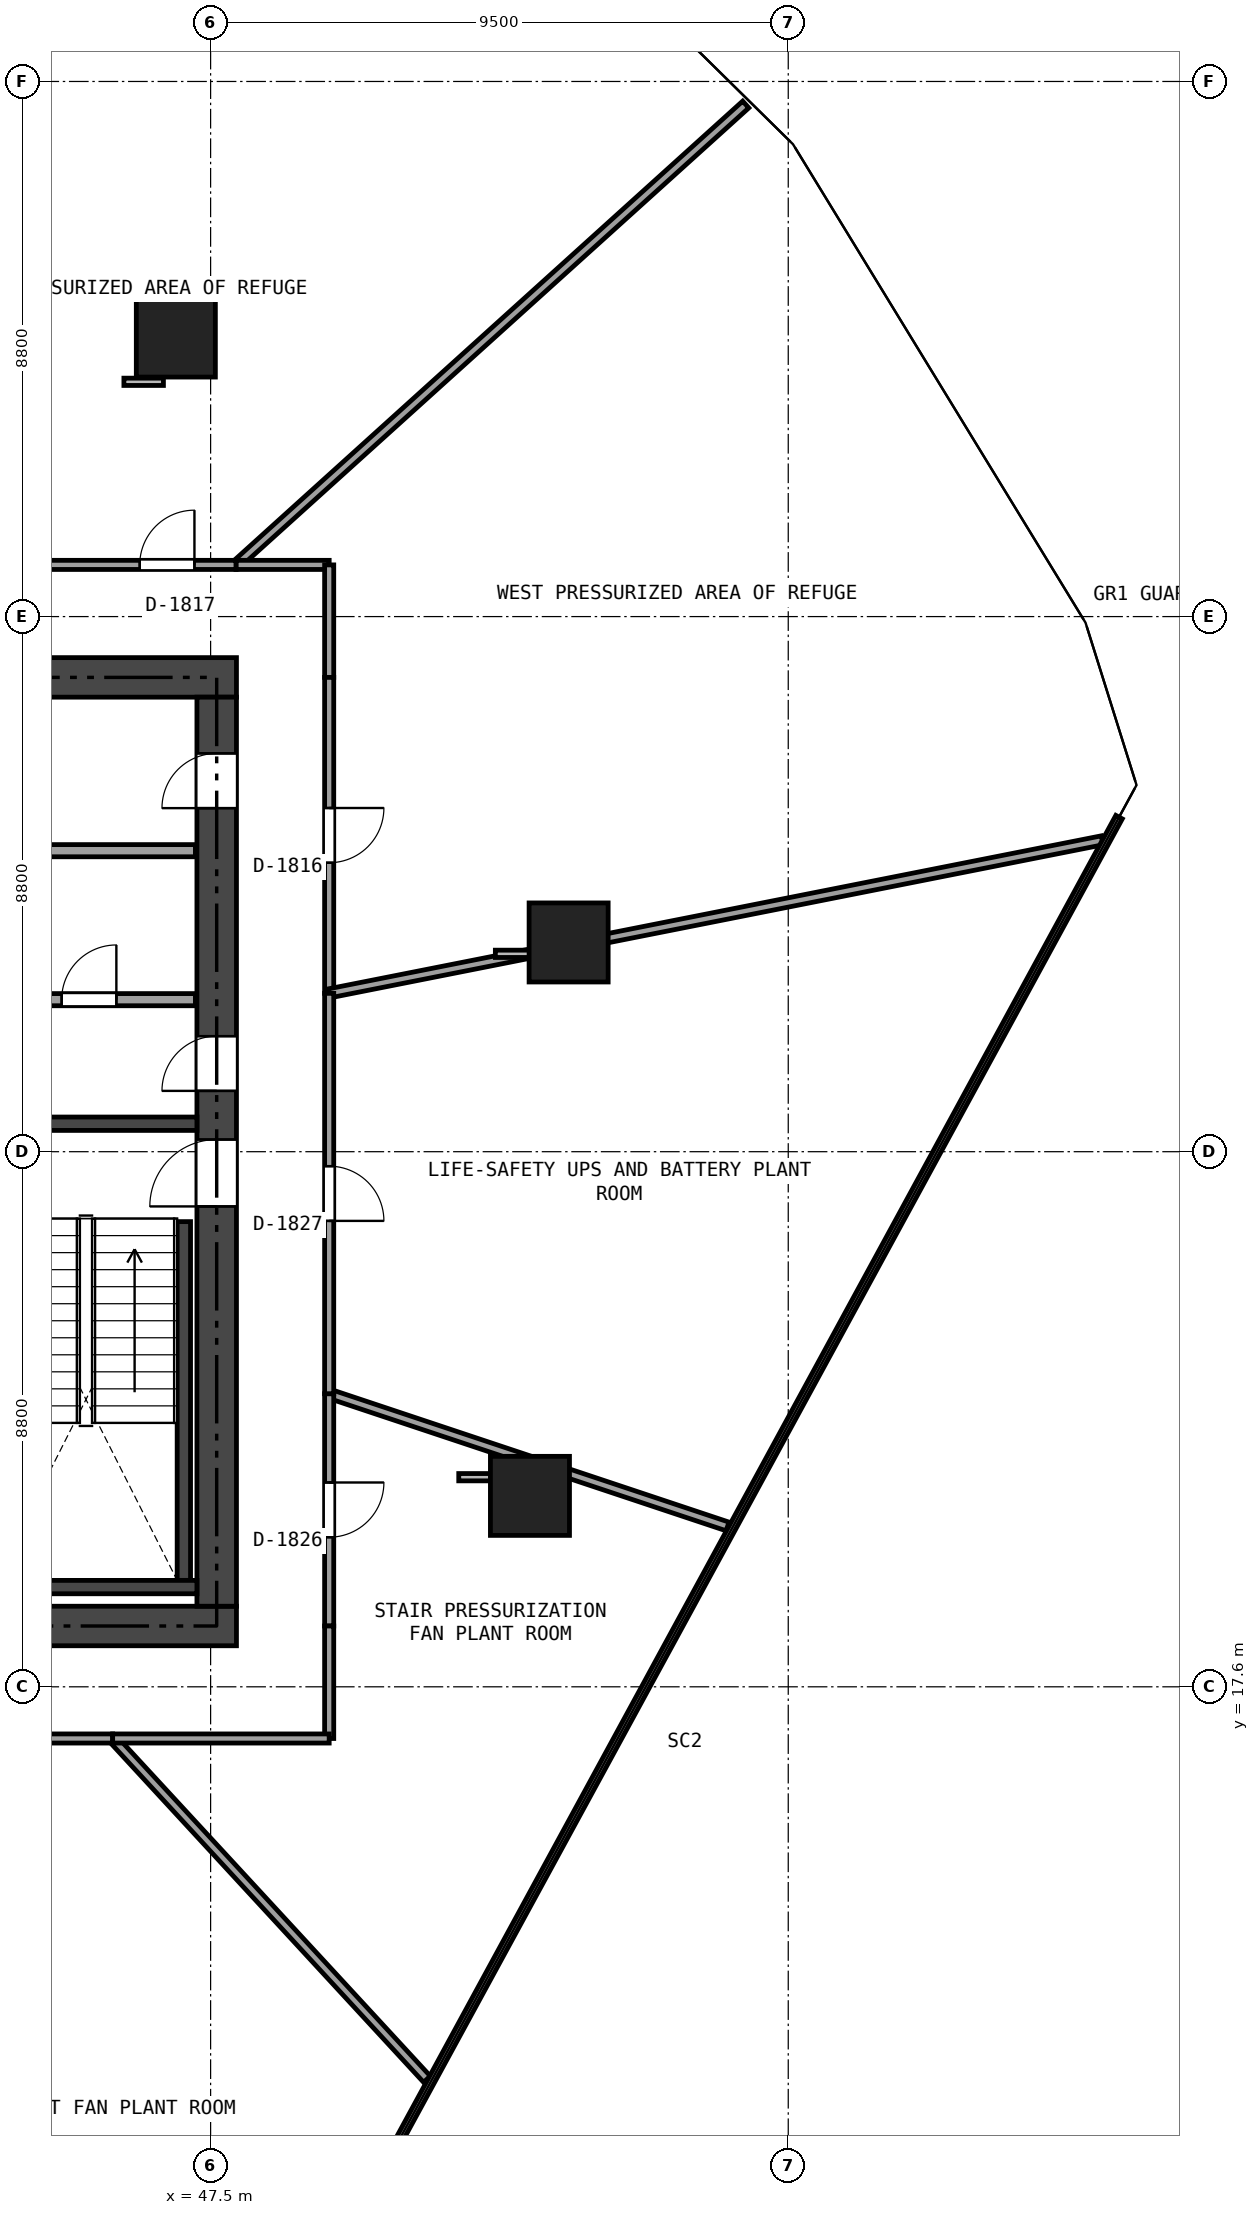
"""IFC4 building model, lengths in metres.
Left out: names, types, materials, properties, quantities, classifications, styles, units other than length and angle.
Written with IfcOpenShell. Run it as: python <this file> out.ifc"""

import sys

from ifc_helpers import new_model, si_unit, direction, frame, frame_2d, origin, origin_2d, place, context, subcontext, project, spatial, rectangle, extrude, element, fill, save


model = new_model("IFC4")
c1 = context("Model", 3, precision=1e-05, world=origin(), true_north=direction((0.0, 1.0)))
c2 = subcontext(c1, "Body", "Model", "MODEL_VIEW")
j1 = project(units=[si_unit("LENGTHUNIT", "METRE"), si_unit("PLANEANGLEUNIT", "RADIAN")], contexts=[c1])
p1 = place(None, origin())
s1 = spatial("IfcSite", under=j1, at=p1, CompositionType="ELEMENT")
p2 = place(p1, origin())
s2 = spatial("IfcBuilding", under=s1, at=p2, CompositionType="ELEMENT")
p3 = place(p2, frame((0.0, 0.0, 71.85)))
s3 = spatial("IfcBuildingStorey", under=s2, at=p3, CompositionType="ELEMENT", Elevation=71.85)
p4 = place(p3, frame((26.475, 18.6, 0.0), z_axis=(0.0, 0.0, 1.0), x_axis=(1.0, 0.0, 0.0)))
e1 = element("IfcWall", 1, at=p4, inside=s3, PredefinedType="SHEAR", context=c2, shape_type="SweptSolid", body=[
    extrude(rectangle(XDim=21.45, YDim=0.65, at=frame_2d((10.725, 0.0))), origin(), (0.0, 0.0, 1.0), 4.08),
])
p5 = place(p4, frame((12.45, 0.0, 0.0)))
e2 = element("IfcOpeningElement", 2, at=p5, cuts=e1, PredefinedType="OPENING", context=c2, shape_type="SweptSolid", body=[
    extrude(rectangle(XDim=1.15, YDim=2.15, at=frame_2d((0.575, 1.075))), frame((0.0, 0.335, 0.0), z_axis=(0.0, -1.0, 0.0), x_axis=(1.0, 0.0, 0.0)), (0.0, 0.0, 1.0), 0.67),
])
p6 = place(p4, frame((5.275, 0.0, 0.0)))
e3 = element("IfcOpeningElement", 3, at=p6, cuts=e1, PredefinedType="OPENING", context=c2, shape_type="SweptSolid", body=[
    extrude(rectangle(XDim=0.9, YDim=2.1, at=frame_2d((0.45, 1.05))), frame((0.0, 0.335, 0.0), z_axis=(0.0, -1.0, 0.0), x_axis=(1.0, 0.0, 0.0)), (0.0, 0.0, 1.0), 0.67),
])
p7 = place(p3, frame((26.475, 34.2, 0.0), z_axis=(0.0, 0.0, 1.0), x_axis=(1.0, 0.0, 0.0)))
e4 = element("IfcWall", 4, at=p7, inside=s3, PredefinedType="SHEAR", context=c2, shape_type="SweptSolid", body=[
    extrude(rectangle(XDim=21.45, YDim=0.65, at=frame_2d((10.725, 0.0))), origin(), (0.0, 0.0, 1.0), 4.08),
])
p8 = place(p7, frame((9.725, 0.0, 0.0)))
e5 = element("IfcOpeningElement", 5, at=p8, cuts=e4, PredefinedType="OPENING", context=c2, shape_type="SweptSolid", body=[
    extrude(rectangle(XDim=1.1, YDim=2.15, at=frame_2d((0.55, 1.075))), frame((0.0, 0.335, 0.0), z_axis=(0.0, -1.0, 0.0), x_axis=(1.0, 0.0, 0.0)), (0.0, 0.0, 1.0), 0.67),
])
p9 = place(p7, frame((1.975, 0.0, 0.0)))
e6 = element("IfcOpeningElement", 6, at=p9, cuts=e4, PredefinedType="OPENING", context=c2, shape_type="SweptSolid", body=[
    extrude(rectangle(XDim=0.9, YDim=2.1, at=frame_2d((0.45, 1.05))), frame((0.0, 0.335, 0.0), z_axis=(0.0, -1.0, 0.0), x_axis=(1.0, 0.0, 0.0)), (0.0, 0.0, 1.0), 0.67),
])
p10 = place(p7, frame((6.275, 0.0, 0.0)))
e7 = element("IfcOpeningElement", 7, at=p10, cuts=e4, PredefinedType="OPENING", context=c2, shape_type="SweptSolid", body=[
    extrude(rectangle(XDim=0.9, YDim=2.1, at=frame_2d((0.45, 1.05))), frame((0.0, 0.335, 0.0), z_axis=(0.0, -1.0, 0.0), x_axis=(1.0, 0.0, 0.0)), (0.0, 0.0, 1.0), 0.67),
])
p11 = place(p3, frame((47.6, 18.925, 0.0), z_axis=(0.0, 0.0, 1.0), x_axis=(0.0, 1.0, 0.0)))
e8 = element("IfcWall", 8, at=p11, inside=s3, PredefinedType="SHEAR", context=c2, shape_type="SweptSolid", body=[
    extrude(rectangle(XDim=14.95, YDim=0.65, at=frame_2d((7.475, 0.0))), origin(), (0.0, 0.0, 1.0), 4.08),
])
p12 = place(p11, frame((6.575, 0.0, 0.0)))
e9 = element("IfcOpeningElement", 9, at=p12, cuts=e8, PredefinedType="OPENING", context=c2, shape_type="SweptSolid", body=[
    extrude(rectangle(XDim=1.1, YDim=2.15, at=frame_2d((0.55, 1.075))), frame((0.0, 0.335, 0.0), z_axis=(0.0, -1.0, 0.0), x_axis=(1.0, 0.0, 0.0)), (0.0, 0.0, 1.0), 0.67),
])
p13 = place(p11, frame((8.475, 0.0, 0.0)))
e10 = element("IfcOpeningElement", 10, at=p13, cuts=e8, PredefinedType="OPENING", context=c2, shape_type="SweptSolid", body=[
    extrude(rectangle(XDim=0.9, YDim=2.1, at=frame_2d((0.45, 1.05))), frame((0.0, 0.335, 0.0), z_axis=(0.0, -1.0, 0.0), x_axis=(1.0, 0.0, 0.0)), (0.0, 0.0, 1.0), 0.67),
])
p14 = place(p11, frame((13.125, 0.0, 0.0)))
e11 = element("IfcOpeningElement", 11, at=p14, cuts=e8, PredefinedType="OPENING", context=c2, shape_type="SweptSolid", body=[
    extrude(rectangle(XDim=0.9, YDim=2.1, at=frame_2d((0.45, 1.05))), frame((0.0, 0.335, 0.0), z_axis=(0.0, -1.0, 0.0), x_axis=(1.0, 0.0, 0.0)), (0.0, 0.0, 1.0), 0.67),
])
p15 = place(p3, frame((43.95, 26.86, 0.0), z_axis=(0.0, 0.0, 1.0), x_axis=(1.0, 0.0, 0.0)))
e12 = element("IfcWall", 12, at=p15, inside=s3, PredefinedType="SHEAR", context=c2, shape_type="SweptSolid", body=[
    extrude(rectangle(XDim=3.325, YDim=0.22, at=frame_2d((1.663, 0.0))), origin(), (0.0, 0.0, 1.0), 4.08),
])
p16 = place(p3, frame((47.06, 19.35, 0.0), z_axis=(0.0, 0.0, 1.0), x_axis=(0.0, 1.0, 0.0)))
e13 = element("IfcWall", 13, at=p16, inside=s3, PredefinedType="SHEAR", context=c2, shape_type="SweptSolid", body=[
    extrude(rectangle(XDim=5.9, YDim=0.22, at=frame_2d((2.95, 0.0))), origin(), (0.0, 0.0, 1.0), 4.08),
])
p17 = place(p3, frame((43.95, 19.24, 0.0), z_axis=(0.0, 0.0, 1.0), x_axis=(1.0, 0.0, 0.0)))
e14 = element("IfcWall", 14, at=p17, inside=s3, PredefinedType="SHEAR", context=c2, shape_type="SweptSolid", body=[
    extrude(rectangle(XDim=3.325, YDim=0.22, at=frame_2d((1.663, 0.0))), origin(), (0.0, 0.0, 1.0), 4.08),
])
for number, where, z_axis, x_axis in (
    (15, (53.388, 29.841, 0.0), (0.0, 0.0, 1.0), (1.0, 0.0, 0.0)),
    (16, (46.928, 39.789, 0.0), (0.0, 0.0, 1.0), (1.0, 0.0, 0.0)),
    (17, (52.752, 20.74, 0.0), (0.0, 0.0, 1.0), (1.0, 0.0, 0.0)),
):
    element("IfcColumn", number, at=place(p3, frame(where, z_axis=z_axis, x_axis=x_axis)), inside=s3, PredefinedType="COLUMN", context=c2, shape_type="SweptSolid", body=[
        extrude(rectangle(XDim=1.3, YDim=1.3, at=origin_2d()), origin(), (0.0, 0.0, 1.0), 4.08),
    ])
p18 = place(p3, frame((43.9, 28.9, 0.0), z_axis=(0.0, 0.0, 1.0), x_axis=(1.0, 0.0, 0.0)))
e18 = element("IfcWall", 18, at=p18, inside=s3, PredefinedType="SOLIDWALL", context=c2, shape_type="SweptSolid", body=[
    extrude(rectangle(XDim=3.35, YDim=0.2, at=frame_2d((1.675, 0.0))), origin(), (0.0, 0.0, 1.0), 4.08),
])
p19 = place(p18, frame((1.15, 0.0, 0.0)))
e19 = element("IfcOpeningElement", 19, at=p19, cuts=e18, PredefinedType="OPENING", context=c2, shape_type="SweptSolid", body=[
    extrude(rectangle(XDim=0.9, YDim=2.1, at=frame_2d((0.45, 1.05))), frame((0.0, 0.11, 0.0), z_axis=(0.0, -1.0, 0.0), x_axis=(1.0, 0.0, 0.0)), (0.0, 0.0, 1.0), 0.22),
])
p20 = place(p3, frame((43.9, 31.35, 0.0), z_axis=(0.0, 0.0, 1.0), x_axis=(1.0, 0.0, 0.0)))
e20 = element("IfcWall", 20, at=p20, inside=s3, PredefinedType="SOLIDWALL", context=c2, shape_type="SweptSolid", body=[
    extrude(rectangle(XDim=3.35, YDim=0.2, at=frame_2d((1.675, 0.0))), origin(), (0.0, 0.0, 1.0), 4.08),
])
p21 = place(p3, frame((56.301, 43.621, 0.0), z_axis=(0.0, 0.0, 1.0), x_axis=(-0.74217442222, -0.670206779287, 0.0)))
e21 = element("IfcWall", 21, at=p21, inside=s3, PredefinedType="PARTITIONING", context=c2, shape_type="SweptSolid", body=[
    extrude(rectangle(XDim=11.297, YDim=0.15, at=frame_2d((5.648, 0.0))), origin(), (0.0, 0.0, 1.0), 3.265),
])
p22 = place(p3, frame((47.917, 36.05, 0.0), z_axis=(0.0, 0.0, 1.0), x_axis=(1.0, 0.0, 0.0)))
e22 = element("IfcWall", 22, at=p22, inside=s3, PredefinedType="PARTITIONING", context=c2, shape_type="SweptSolid", body=[
    extrude(rectangle(XDim=1.533, YDim=0.15, at=frame_2d((0.767, 0.0))), origin(), (0.0, 0.0, 1.0), 3.265),
])
p23 = place(p3, frame((49.45, 36.05, 0.0), z_axis=(0.0, 0.0, 1.0), x_axis=(0.0, -1.0, 0.0)))
e23 = element("IfcWall", 23, at=p23, inside=s3, PredefinedType="PARTITIONING", context=c2, shape_type="SweptSolid", body=[
    extrude(rectangle(XDim=1.85, YDim=0.15, at=frame_2d((0.925, 0.0))), origin(), (0.0, 0.0, 1.0), 3.265),
])
p24 = place(p3, frame((49.45, 34.2, 0.0), z_axis=(0.0, 0.0, 1.0), x_axis=(0.0, -1.0, 0.0)))
e24 = element("IfcWall", 24, at=p24, inside=s3, PredefinedType="PARTITIONING", context=c2, shape_type="SweptSolid", body=[
    extrude(rectangle(XDim=5.196, YDim=0.15, at=frame_2d((2.598, 0.0))), origin(), (0.0, 0.0, 1.0), 3.065),
])
p25 = place(p24, frame((2.148, 0.0, 0.0)))
e25 = element("IfcOpeningElement", 25, at=p25, cuts=e24, PredefinedType="OPENING", context=c2, shape_type="SweptSolid", body=[
    extrude(rectangle(XDim=0.9, YDim=2.0, at=frame_2d((0.45, 1.0))), frame((0.0, 0.085, 0.0), z_axis=(0.0, -1.0, 0.0), x_axis=(1.0, 0.0, 0.0)), (0.0, 0.0, 1.0), 0.17),
])
p26 = place(p3, frame((49.45, 29.004, 0.0), z_axis=(0.0, 0.0, 1.0), x_axis=(0.980960623522, 0.194206732886, 0.0)))
e26 = element("IfcWall", 26, at=p26, inside=s3, PredefinedType="PARTITIONING", context=c2, shape_type="SweptSolid", body=[
    extrude(rectangle(XDim=12.961, YDim=0.15, at=frame_2d((6.48, 0.0))), origin(), (0.0, 0.0, 1.0), 3.065),
])
p27 = place(p3, frame((40.335, 36.05, 0.0), z_axis=(0.0, 0.0, 1.0), x_axis=(1.0, 0.0, 0.0)))
e27 = element("IfcWall", 27, at=p27, inside=s3, PredefinedType="PARTITIONING", context=c2, shape_type="SweptSolid", body=[
    extrude(rectangle(XDim=7.582, YDim=0.15, at=frame_2d((3.791, 0.0))), origin(), (0.0, 0.0, 1.0), 3.065),
])
p28 = place(p27, frame((5.999, 0.0, 0.0)))
e28 = element("IfcOpeningElement", 28, at=p28, cuts=e27, PredefinedType="OPENING", context=c2, shape_type="SweptSolid", body=[
    extrude(rectangle(XDim=0.9, YDim=2.0, at=frame_2d((0.45, 1.0))), frame((0.0, 0.085, 0.0), z_axis=(0.0, -1.0, 0.0), x_axis=(1.0, 0.0, 0.0)), (0.0, 0.0, 1.0), 0.17),
])
p29 = place(p3, frame((51.058, 11.147, 0.0), z_axis=(0.0, 0.0, 1.0), x_axis=(-0.678079226392, 0.734988818103, 0.0)))
e29 = element("IfcWall", 29, at=p29, inside=s3, PredefinedType="PARTITIONING", context=c2, shape_type="SweptSolid", body=[
    extrude(rectangle(XDim=7.623, YDim=0.15, at=frame_2d((3.812, 0.0))), origin(), (0.0, 0.0, 1.0), 3.265),
])
p30 = place(p3, frame((45.889, 16.75, 0.0), z_axis=(0.0, 0.0, 1.0), x_axis=(-1.0, 0.0, 0.0)))
e30 = element("IfcWall", 30, at=p30, inside=s3, PredefinedType="PARTITIONING", context=c2, shape_type="SweptSolid", body=[
    extrude(rectangle(XDim=6.638, YDim=0.15, at=frame_2d((3.319, 0.0))), origin(), (0.0, 0.0, 1.0), 3.065),
])
p31 = place(p30, frame((2.869, 0.0, 0.0)))
e31 = element("IfcOpeningElement", 31, at=p31, cuts=e30, PredefinedType="OPENING", context=c2, shape_type="SweptSolid", body=[
    extrude(rectangle(XDim=0.9, YDim=2.0, at=frame_2d((0.45, 1.0))), frame((0.0, 0.085, 0.0), z_axis=(0.0, -1.0, 0.0), x_axis=(1.0, 0.0, 0.0)), (0.0, 0.0, 1.0), 0.17),
])
p32 = place(p3, frame((56.002, 20.237, 0.0), z_axis=(0.0, 0.0, 1.0), x_axis=(-0.94873277877, 0.316079285128, 0.0)))
e32 = element("IfcWall", 32, at=p32, inside=s3, PredefinedType="PARTITIONING", context=c2, shape_type="SweptSolid", body=[
    extrude(rectangle(XDim=6.906, YDim=0.15, at=frame_2d((3.453, 0.0))), origin(), (0.0, 0.0, 1.0), 4.08),
])
p33 = place(p3, frame((49.45, 22.42, 0.0), z_axis=(0.0, 0.0, 1.0), x_axis=(0.0, -1.0, 0.0)))
e33 = element("IfcWall", 33, at=p33, inside=s3, PredefinedType="PARTITIONING", context=c2, shape_type="SweptSolid", body=[
    extrude(rectangle(XDim=3.82, YDim=0.15, at=frame_2d((1.91, 0.0))), origin(), (0.0, 0.0, 1.0), 3.065),
])
p34 = place(p33, frame((1.46, 0.0, 0.0)))
e34 = element("IfcOpeningElement", 34, at=p34, cuts=e33, PredefinedType="OPENING", context=c2, shape_type="SweptSolid", body=[
    extrude(rectangle(XDim=0.9, YDim=2.0, at=frame_2d((0.45, 1.0))), frame((0.0, 0.085, 0.0), z_axis=(0.0, -1.0, 0.0), x_axis=(1.0, 0.0, 0.0)), (0.0, 0.0, 1.0), 0.17),
])
p35 = place(p3, frame((49.45, 18.6, 0.0), z_axis=(0.0, 0.0, 1.0), x_axis=(0.0, -1.0, 0.0)))
e35 = element("IfcWall", 35, at=p35, inside=s3, PredefinedType="PARTITIONING", context=c2, shape_type="SweptSolid", body=[
    extrude(rectangle(XDim=1.85, YDim=0.15, at=frame_2d((0.925, 0.0))), origin(), (0.0, 0.0, 1.0), 3.265),
])
p36 = place(p3, frame((49.45, 16.75, 0.0), z_axis=(0.0, 0.0, 1.0), x_axis=(-1.0, 0.0, 0.0)))
e36 = element("IfcWall", 36, at=p36, inside=s3, PredefinedType="PARTITIONING", context=c2, shape_type="SweptSolid", body=[
    extrude(rectangle(XDim=3.561, YDim=0.15, at=frame_2d((1.781, 0.0))), origin(), (0.0, 0.0, 1.0), 3.265),
])
p37 = place(p3, frame((49.45, 29.004, 0.0), z_axis=(0.0, 0.0, 1.0), x_axis=(0.0, -1.0, 0.0)))
e37 = element("IfcWall", 37, at=p37, inside=s3, PredefinedType="PARTITIONING", context=c2, shape_type="SweptSolid", body=[
    extrude(rectangle(XDim=6.584, YDim=0.15, at=frame_2d((3.292, 0.0))), origin(), (0.0, 0.0, 1.0), 3.065),
])
p38 = place(p37, frame((2.842, 0.0, 0.0)))
e38 = element("IfcOpeningElement", 38, at=p38, cuts=e37, PredefinedType="OPENING", context=c2, shape_type="SweptSolid", body=[
    extrude(rectangle(XDim=0.9, YDim=2.0, at=frame_2d((0.45, 1.0))), frame((0.0, 0.085, 0.0), z_axis=(0.0, -1.0, 0.0), x_axis=(1.0, 0.0, 0.0)), (0.0, 0.0, 1.0), 0.17),
])
p39 = place(p12, origin())
e39 = element("IfcDoor", 39, at=p39, inside=s3, OperationType="SINGLE_SWING_LEFT", PredefinedType="DOOR", context=c2, shape_type="SweptSolid", body=[
    extrude(rectangle(XDim=1.1, YDim=2.15, at=frame_2d((0.55, 1.075))), frame((0.0, 0.025, 0.0), z_axis=(0.0, -1.0, 0.0), x_axis=(1.0, 0.0, 0.0)), (0.0, 0.0, 1.0), 0.05),
])
fill(e9, e39)
p40 = place(p13, origin())
e40 = element("IfcDoor", 40, at=p40, inside=s3, OperationType="SINGLE_SWING_LEFT", PredefinedType="DOOR", context=c2, shape_type="SweptSolid", body=[
    extrude(rectangle(XDim=0.9, YDim=2.1, at=frame_2d((0.45, 1.05))), frame((0.0, 0.025, 0.0), z_axis=(0.0, -1.0, 0.0), x_axis=(1.0, 0.0, 0.0)), (0.0, 0.0, 1.0), 0.05),
])
fill(e10, e40)
p41 = place(p19, origin())
e41 = element("IfcDoor", 41, at=p41, inside=s3, OperationType="SINGLE_SWING_RIGHT", PredefinedType="DOOR", context=c2, shape_type="SweptSolid", body=[
    extrude(rectangle(XDim=0.9, YDim=2.1, at=frame_2d((0.45, 1.05))), frame((0.0, 0.025, 0.0), z_axis=(0.0, -1.0, 0.0), x_axis=(1.0, 0.0, 0.0)), (0.0, 0.0, 1.0), 0.05),
])
fill(e19, e41)
p42 = place(p14, origin())
e42 = element("IfcDoor", 42, at=p42, inside=s3, OperationType="SINGLE_SWING_LEFT", PredefinedType="DOOR", context=c2, shape_type="SweptSolid", body=[
    extrude(rectangle(XDim=0.9, YDim=2.1, at=frame_2d((0.45, 1.05))), frame((0.0, 0.025, 0.0), z_axis=(0.0, -1.0, 0.0), x_axis=(1.0, 0.0, 0.0)), (0.0, 0.0, 1.0), 0.05),
])
fill(e11, e42)
p43 = place(p25, origin())
e43 = element("IfcDoor", 43, at=p43, inside=s3, OperationType="SINGLE_SWING_LEFT", PredefinedType="DOOR", context=c2, shape_type="SweptSolid", body=[
    extrude(rectangle(XDim=0.9, YDim=2.0, at=frame_2d((0.45, 1.0))), frame((0.0, 0.025, 0.0), z_axis=(0.0, -1.0, 0.0), x_axis=(1.0, 0.0, 0.0)), (0.0, 0.0, 1.0), 0.05),
])
fill(e25, e43)
p44 = place(p28, origin())
e44 = element("IfcDoor", 44, at=p44, inside=s3, OperationType="SINGLE_SWING_RIGHT", PredefinedType="DOOR", context=c2, shape_type="SweptSolid", body=[
    extrude(rectangle(XDim=0.9, YDim=2.0, at=frame_2d((0.45, 1.0))), frame((0.0, 0.025, 0.0), z_axis=(0.0, -1.0, 0.0), x_axis=(1.0, 0.0, 0.0)), (0.0, 0.0, 1.0), 0.05),
])
fill(e28, e44)
p45 = place(p34, origin())
e45 = element("IfcDoor", 45, at=p45, inside=s3, OperationType="SINGLE_SWING_LEFT", PredefinedType="DOOR", context=c2, shape_type="SweptSolid", body=[
    extrude(rectangle(XDim=0.9, YDim=2.0, at=frame_2d((0.45, 1.0))), frame((0.0, 0.025, 0.0), z_axis=(0.0, -1.0, 0.0), x_axis=(1.0, 0.0, 0.0)), (0.0, 0.0, 1.0), 0.05),
])
fill(e34, e45)
p46 = place(p38, origin())
e46 = element("IfcDoor", 46, at=p46, inside=s3, OperationType="SINGLE_SWING_RIGHT", PredefinedType="DOOR", context=c2, shape_type="SweptSolid", body=[
    extrude(rectangle(XDim=0.9, YDim=2.0, at=frame_2d((0.45, 1.0))), frame((0.0, 0.025, 0.0), z_axis=(0.0, -1.0, 0.0), x_axis=(1.0, 0.0, 0.0)), (0.0, 0.0, 1.0), 0.05),
])
fill(e38, e46)
save(model, sys.argv[1])
